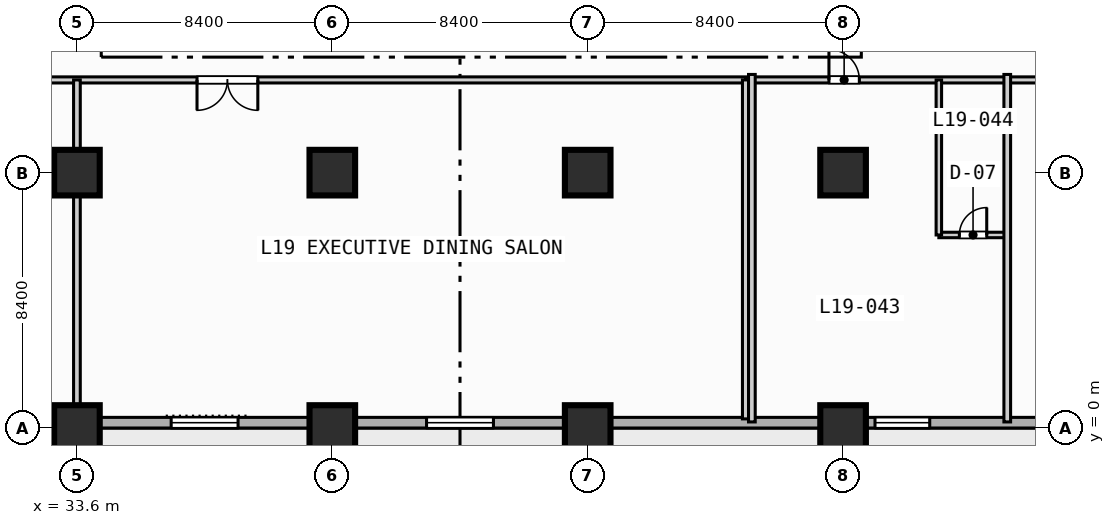
"""IFC4 building model, lengths in metres.
Left out: names, types, materials, properties, quantities, classifications, styles, units other than length and angle.
Written with IfcOpenShell. Run it as: python <this file> out.ifc"""

import sys

from ifc_helpers import new_model, si_unit, direction, frame, frame_2d, origin, origin_2d, place, context, subcontext, project, spatial, rectangle, extrude, element, fill, save


model = new_model("IFC4")
c1 = context("Model", 3, precision=1e-05, world=origin(), true_north=direction((0.0, 1.0)))
c2 = subcontext(c1, "Body", "Model", "MODEL_VIEW")
j1 = project(units=[si_unit("LENGTHUNIT", "METRE"), si_unit("PLANEANGLEUNIT", "RADIAN")], contexts=[c1])
p1 = place(None, origin())
s1 = spatial("IfcSite", under=j1, at=p1, CompositionType="ELEMENT")
p2 = place(p1, origin())
s2 = spatial("IfcBuilding", under=s1, at=p2, CompositionType="ELEMENT")
p3 = place(p2, frame((0.0, 0.0, 81.4)))
s3 = spatial("IfcBuildingStorey", under=s2, at=p3, CompositionType="ELEMENT", Elevation=81.4)
for number, where, z_axis, x_axis in (
    (1, (33.6, 0.0, 0.0), (0.0, 0.0, 1.0), (1.0, 0.0, 0.0)),
    (2, (33.6, 8.4, 0.0), (0.0, 0.0, 1.0), (1.0, 0.0, 0.0)),
    (3, (42.0, 0.0, 0.0), (0.0, 0.0, 1.0), (1.0, 0.0, 0.0)),
    (4, (42.0, 8.4, 0.0), (0.0, 0.0, 1.0), (1.0, 0.0, 0.0)),
    (5, (50.4, 0.0, 0.0), (0.0, 0.0, 1.0), (1.0, 0.0, 0.0)),
    (6, (50.4, 8.4, 0.0), (0.0, 0.0, 1.0), (1.0, 0.0, 0.0)),
    (7, (58.8, 0.0, 0.0), (0.0, 0.0, 1.0), (1.0, 0.0, 0.0)),
    (8, (58.8, 8.4, 0.0), (0.0, 0.0, 1.0), (1.0, 0.0, 0.0)),
):
    element("IfcColumn", number, at=place(p3, frame(where, z_axis=z_axis, x_axis=x_axis)), inside=s3, PredefinedType="COLUMN", context=c2, shape_type="SweptSolid", body=[
        extrude(rectangle(XDim=1.5, YDim=1.5, at=origin_2d()), origin(), (0.0, 0.0, 1.0), 3.8),
    ])
p4 = place(p3, frame((89.225, 0.175, 0.0), z_axis=(0.0, 0.0, 1.0), x_axis=(-1.0, 0.0, 0.0)))
e9 = element("IfcWall", 9, at=p4, inside=s3, PredefinedType="STANDARD", context=c2, shape_type="SweptSolid", body=[
    extrude(rectangle(XDim=86.05, YDim=0.35, at=frame_2d((43.025, 0.0))), origin(), (0.0, 0.0, 1.0), 3.55),
])
p5 = place(p4, frame((67.525, 0.0, 0.0)))
e10 = element("IfcOpeningElement", 10, at=p5, cuts=e9, PredefinedType="OPENING", context=c2, shape_type="SweptSolid", body=[
    extrude(rectangle(XDim=1.4, YDim=2.2, at=frame_2d((0.7, 1.1))), frame((0.0, 0.185, 0.0), z_axis=(0.0, -1.0, 0.0), x_axis=(1.0, 0.0, 0.0)), (0.0, 0.0, 1.0), 0.37),
])
p6 = place(p4, frame((58.725, 0.0, 0.85)))
e11 = element("IfcOpeningElement", 11, at=p6, cuts=e9, PredefinedType="OPENING", context=c2, shape_type="SweptSolid", body=[
    extrude(rectangle(XDim=2.2, YDim=1.8, at=frame_2d((1.1, 0.9))), frame((0.0, 0.185, 0.0), z_axis=(0.0, -1.0, 0.0), x_axis=(1.0, 0.0, 0.0)), (0.0, 0.0, 1.0), 0.37),
])
p7 = place(p4, frame((50.325, 0.0, 0.85)))
e12 = element("IfcOpeningElement", 12, at=p7, cuts=e9, PredefinedType="OPENING", context=c2, shape_type="SweptSolid", body=[
    extrude(rectangle(XDim=2.2, YDim=1.8, at=frame_2d((1.1, 0.9))), frame((0.0, 0.185, 0.0), z_axis=(0.0, -1.0, 0.0), x_axis=(1.0, 0.0, 0.0)), (0.0, 0.0, 1.0), 0.37),
])
p8 = place(p4, frame((41.925, 0.0, 0.85)))
e13 = element("IfcOpeningElement", 13, at=p8, cuts=e9, PredefinedType="OPENING", context=c2, shape_type="SweptSolid", body=[
    extrude(rectangle(XDim=2.2, YDim=1.8, at=frame_2d((1.1, 0.9))), frame((0.0, 0.185, 0.0), z_axis=(0.0, -1.0, 0.0), x_axis=(1.0, 0.0, 0.0)), (0.0, 0.0, 1.0), 0.37),
])
p9 = place(p4, frame((27.575, 0.0, 0.85)))
e14 = element("IfcOpeningElement", 14, at=p9, cuts=e9, PredefinedType="OPENING", context=c2, shape_type="SweptSolid", body=[
    extrude(rectangle(XDim=1.8, YDim=1.8, at=frame_2d((0.9, 0.9))), frame((0.0, 0.185, 0.0), z_axis=(0.0, -1.0, 0.0), x_axis=(1.0, 0.0, 0.0)), (0.0, 0.0, 1.0), 0.37),
])
p10 = place(p4, frame((19.175, 0.0, 0.85)))
e15 = element("IfcOpeningElement", 15, at=p10, cuts=e9, PredefinedType="OPENING", context=c2, shape_type="SweptSolid", body=[
    extrude(rectangle(XDim=1.8, YDim=1.8, at=frame_2d((0.9, 0.9))), frame((0.0, 0.185, 0.0), z_axis=(0.0, -1.0, 0.0), x_axis=(1.0, 0.0, 0.0)), (0.0, 0.0, 1.0), 0.37),
])
p11 = place(p4, frame((10.775, 0.0, 0.85)))
e16 = element("IfcOpeningElement", 16, at=p11, cuts=e9, PredefinedType="OPENING", context=c2, shape_type="SweptSolid", body=[
    extrude(rectangle(XDim=1.8, YDim=1.8, at=frame_2d((0.9, 0.9))), frame((0.0, 0.185, 0.0), z_axis=(0.0, -1.0, 0.0), x_axis=(1.0, 0.0, 0.0)), (0.0, 0.0, 1.0), 0.37),
])
p12 = place(p4, frame((2.425, 0.0, 0.85)))
e17 = element("IfcOpeningElement", 17, at=p12, cuts=e9, PredefinedType="OPENING", context=c2, shape_type="SweptSolid", body=[
    extrude(rectangle(XDim=1.8, YDim=1.8, at=frame_2d((0.9, 0.9))), frame((0.0, 0.185, 0.0), z_axis=(0.0, -1.0, 0.0), x_axis=(1.0, 0.0, 0.0)), (0.0, 0.0, 1.0), 0.37),
])
p13 = place(p3, frame((13.55, 11.45, 0.0), z_axis=(0.0, 0.0, 1.0), x_axis=(1.0, 0.0, 0.0)))
e18 = element("IfcWall", 18, at=p13, inside=s3, PredefinedType="PARTITIONING", context=c2, shape_type="SweptSolid", body=[
    extrude(rectangle(XDim=42.05, YDim=0.2, at=frame_2d((21.025, 0.0))), origin(), (0.0, 0.0, 1.0), 3.55),
])
p14 = place(p13, frame((5.0, 0.0, 0.0)))
e19 = element("IfcOpeningElement", 19, at=p14, cuts=e18, PredefinedType="OPENING", context=c2, shape_type="SweptSolid", body=[
    extrude(rectangle(XDim=2.0, YDim=2.15, at=frame_2d((1.0, 1.075))), frame((0.0, 0.11, 0.0), z_axis=(0.0, -1.0, 0.0), x_axis=(1.0, 0.0, 0.0)), (0.0, 0.0, 1.0), 0.22),
])
p15 = place(p13, frame((24.0, 0.0, 0.0)))
e20 = element("IfcOpeningElement", 20, at=p15, cuts=e18, PredefinedType="OPENING", context=c2, shape_type="SweptSolid", body=[
    extrude(rectangle(XDim=2.0, YDim=2.15, at=frame_2d((1.0, 1.075))), frame((0.0, 0.11, 0.0), z_axis=(0.0, -1.0, 0.0), x_axis=(1.0, 0.0, 0.0)), (0.0, 0.0, 1.0), 0.22),
])
p16 = place(p3, frame((33.6, 0.3, 0.0), z_axis=(0.0, 0.0, 1.0), x_axis=(0.0, 1.0, 0.0)))
e21 = element("IfcWall", 21, at=p16, inside=s3, PredefinedType="PARTITIONING", context=c2, shape_type="SweptSolid", body=[
    extrude(rectangle(XDim=11.15, YDim=0.22, at=frame_2d((5.575, 0.0))), origin(), (0.0, 0.0, 1.0), 2.8),
])
p17 = place(p3, frame((55.6, 0.3, 0.0), z_axis=(0.0, 0.0, 1.0), x_axis=(0.0, 1.0, 0.0)))
e22 = element("IfcWall", 22, at=p17, inside=s3, PredefinedType="PARTITIONING", context=c2, shape_type="SweptSolid", body=[
    extrude(rectangle(XDim=11.15, YDim=0.22, at=frame_2d((5.575, 0.0))), origin(), (0.0, 0.0, 1.0), 3.55),
])
p18 = place(p3, frame((55.8, 11.45, 0.0), z_axis=(0.0, 0.0, 1.0), x_axis=(1.0, 0.0, 0.0)))
e23 = element("IfcWall", 23, at=p18, inside=s3, PredefinedType="PARTITIONING", context=c2, shape_type="SweptSolid", body=[
    extrude(rectangle(XDim=33.0, YDim=0.2, at=frame_2d((16.5, 0.0))), origin(), (0.0, 0.0, 1.0), 3.55),
])
p19 = place(p18, frame((2.535, 0.0, 0.0)))
e24 = element("IfcOpeningElement", 24, at=p19, cuts=e23, PredefinedType="OPENING", context=c2, shape_type="SweptSolid", body=[
    extrude(rectangle(XDim=1.0, YDim=2.15, at=frame_2d((0.5, 1.075))), frame((0.0, 0.11, 0.0), z_axis=(0.0, -1.0, 0.0), x_axis=(1.0, 0.0, 0.0)), (0.0, 0.0, 1.0), 0.22),
])
p20 = place(p18, frame((10.935, 0.0, 0.0)))
e25 = element("IfcOpeningElement", 25, at=p20, cuts=e23, PredefinedType="OPENING", context=c2, shape_type="SweptSolid", body=[
    extrude(rectangle(XDim=1.0, YDim=2.15, at=frame_2d((0.5, 1.075))), frame((0.0, 0.11, 0.0), z_axis=(0.0, -1.0, 0.0), x_axis=(1.0, 0.0, 0.0)), (0.0, 0.0, 1.0), 0.22),
])
p21 = place(p18, frame((19.335, 0.0, 0.0)))
e26 = element("IfcOpeningElement", 26, at=p21, cuts=e23, PredefinedType="OPENING", context=c2, shape_type="SweptSolid", body=[
    extrude(rectangle(XDim=1.0, YDim=2.15, at=frame_2d((0.5, 1.075))), frame((0.0, 0.11, 0.0), z_axis=(0.0, -1.0, 0.0), x_axis=(1.0, 0.0, 0.0)), (0.0, 0.0, 1.0), 0.22),
])
p22 = place(p18, frame((27.435, 0.0, 0.0)))
e27 = element("IfcOpeningElement", 27, at=p22, cuts=e23, PredefinedType="OPENING", context=c2, shape_type="SweptSolid", body=[
    extrude(rectangle(XDim=1.0, YDim=2.15, at=frame_2d((0.5, 1.075))), frame((0.0, 0.11, 0.0), z_axis=(0.0, -1.0, 0.0), x_axis=(1.0, 0.0, 0.0)), (0.0, 0.0, 1.0), 0.22),
])
p23 = place(p3, frame((55.8, 0.2, 0.0), z_axis=(0.0, 0.0, 1.0), x_axis=(0.0, 1.0, 0.0)))
e28 = element("IfcWall", 28, at=p23, inside=s3, PredefinedType="PARTITIONING", context=c2, shape_type="SweptSolid", body=[
    extrude(rectangle(XDim=11.43, YDim=0.22, at=frame_2d((5.715, 0.0))), origin(), (0.0, 0.0, 1.0), 3.55),
])
p24 = place(p3, frame((61.95, 6.35, 0.0), z_axis=(0.0, 0.0, 1.0), x_axis=(1.0, 0.0, 0.0)))
e29 = element("IfcWall", 29, at=p24, inside=s3, PredefinedType="PLUMBINGWALL", context=c2, shape_type="SweptSolid", body=[
    extrude(rectangle(XDim=2.25, YDim=0.18, at=frame_2d((1.125, 0.0))), origin(), (0.0, 0.0, 1.0), 3.55),
])
p25 = place(p24, frame((0.675, 0.0, 0.0)))
e30 = element("IfcOpeningElement", 30, at=p25, cuts=e29, PredefinedType="OPENING", context=c2, shape_type="SweptSolid", body=[
    extrude(rectangle(XDim=0.9, YDim=2.1, at=frame_2d((0.45, 1.05))), frame((0.0, 0.1, 0.0), z_axis=(0.0, -1.0, 0.0), x_axis=(1.0, 0.0, 0.0)), (0.0, 0.0, 1.0), 0.2),
])
p26 = place(p3, frame((61.95, 6.35, 0.0), z_axis=(0.0, 0.0, 1.0), x_axis=(0.0, 1.0, 0.0)))
e31 = element("IfcWall", 31, at=p26, inside=s3, PredefinedType="PLUMBINGWALL", context=c2, shape_type="SweptSolid", body=[
    extrude(rectangle(XDim=5.1, YDim=0.18, at=frame_2d((2.55, 0.0))), origin(), (0.0, 0.0, 1.0), 3.55),
])
p27 = place(p3, frame((64.2, 0.2, 0.0), z_axis=(0.0, 0.0, 1.0), x_axis=(0.0, 1.0, 0.0)))
e32 = element("IfcWall", 32, at=p27, inside=s3, PredefinedType="PARTITIONING", context=c2, shape_type="SweptSolid", body=[
    extrude(rectangle(XDim=11.43, YDim=0.22, at=frame_2d((5.715, 0.0))), origin(), (0.0, 0.0, 1.0), 3.55),
])
p28 = place(p7, origin())
e33 = element("IfcWindow", 33, at=p28, inside=s3, PartitioningType="SINGLE_PANEL", PredefinedType="WINDOW", context=c2, shape_type="SweptSolid", body=[
    extrude(rectangle(XDim=2.2, YDim=1.8, at=frame_2d((1.1, 0.9))), frame((0.0, 0.03, 0.0), z_axis=(0.0, -1.0, 0.0), x_axis=(1.0, 0.0, 0.0)), (0.0, 0.0, 1.0), 0.06),
])
fill(e12, e33)
p29 = place(p8, origin())
e34 = element("IfcWindow", 34, at=p29, inside=s3, PartitioningType="SINGLE_PANEL", PredefinedType="WINDOW", context=c2, shape_type="SweptSolid", body=[
    extrude(rectangle(XDim=2.2, YDim=1.8, at=frame_2d((1.1, 0.9))), frame((0.0, 0.03, 0.0), z_axis=(0.0, -1.0, 0.0), x_axis=(1.0, 0.0, 0.0)), (0.0, 0.0, 1.0), 0.06),
])
fill(e13, e34)
p30 = place(p9, origin())
e35 = element("IfcWindow", 35, at=p30, inside=s3, PartitioningType="SINGLE_PANEL", PredefinedType="WINDOW", context=c2, shape_type="SweptSolid", body=[
    extrude(rectangle(XDim=1.8, YDim=1.8, at=frame_2d((0.9, 0.9))), frame((0.0, 0.03, 0.0), z_axis=(0.0, -1.0, 0.0), x_axis=(1.0, 0.0, 0.0)), (0.0, 0.0, 1.0), 0.06),
])
fill(e14, e35)
p31 = place(p15, origin())
e36 = element("IfcDoor", 36, at=p31, inside=s3, OperationType="SINGLE_SWING_RIGHT", PredefinedType="DOOR", context=c2, shape_type="SweptSolid", body=[
    extrude(rectangle(XDim=2.0, YDim=2.15, at=frame_2d((1.0, 1.075))), frame((0.0, 0.025, 0.0), z_axis=(0.0, -1.0, 0.0), x_axis=(1.0, 0.0, 0.0)), (0.0, 0.0, 1.0), 0.05),
])
fill(e20, e36)
p32 = place(p19, origin())
e37 = element("IfcDoor", 37, at=p32, inside=s3, OperationType="SINGLE_SWING_LEFT", PredefinedType="DOOR", context=c2, shape_type="SweptSolid", body=[
    extrude(rectangle(XDim=1.0, YDim=2.15, at=frame_2d((0.5, 1.075))), frame((0.0, 0.025, 0.0), z_axis=(0.0, -1.0, 0.0), x_axis=(1.0, 0.0, 0.0)), (0.0, 0.0, 1.0), 0.05),
])
fill(e24, e37)
p33 = place(p25, origin())
e38 = element("IfcDoor", 38, at=p33, inside=s3, OperationType="SINGLE_SWING_RIGHT", PredefinedType="DOOR", context=c2, shape_type="SweptSolid", body=[
    extrude(rectangle(XDim=0.9, YDim=2.1, at=frame_2d((0.45, 1.05))), frame((0.0, 0.025, 0.0), z_axis=(0.0, -1.0, 0.0), x_axis=(1.0, 0.0, 0.0)), (0.0, 0.0, 1.0), 0.05),
])
fill(e30, e38)
save(model, sys.argv[1])
